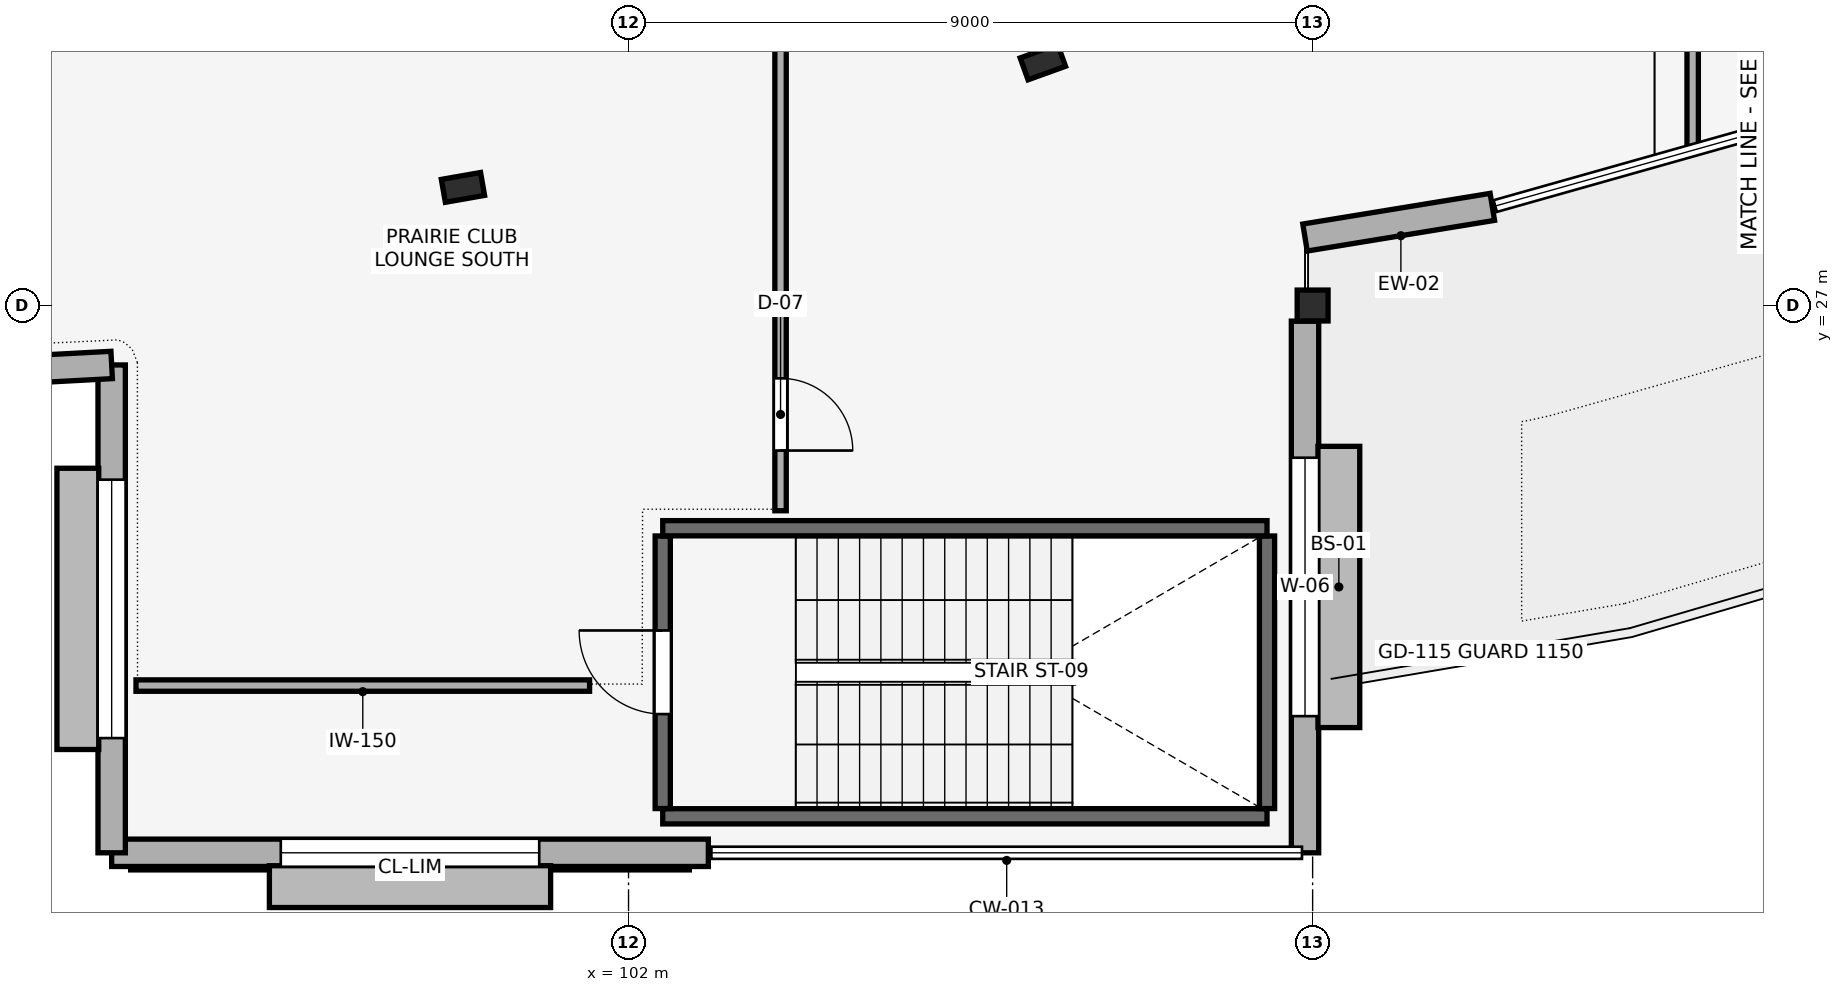
"""IFC4 building model, lengths in metres.
Left out: names, types, materials, properties, quantities, classifications, styles, units other than length and angle.
Written with IfcOpenShell. Run it as: python <this file> out.ifc"""

import sys

from ifc_helpers import new_model, si_unit, direction, frame, frame_2d, origin, origin_2d, place, context, subcontext, project, spatial, rectangle, hollow_circle, i_section, extrude, element, fill, save


model = new_model("IFC4")
c1 = context("Model", 3, precision=1e-05, world=origin(), true_north=direction((0.0, 1.0)))
c2 = subcontext(c1, "Body", "Model", "MODEL_VIEW")
j1 = project(units=[si_unit("LENGTHUNIT", "METRE"), si_unit("PLANEANGLEUNIT", "RADIAN")], contexts=[c1])
p1 = place(None, origin())
s1 = spatial("IfcSite", under=j1, at=p1, CompositionType="ELEMENT")
p2 = place(p1, origin())
s2 = spatial("IfcBuilding", under=s1, at=p2, CompositionType="ELEMENT")
p3 = place(p2, frame((0.0, 0.0, 10.2)))
s3 = spatial("IfcBuildingStorey", under=s2, at=p3, CompositionType="ELEMENT", Elevation=10.2)
for number, where, z_axis, x_axis in (
    (1, (99.822, 28.554, 0.0), (0.0, 0.0, 1.0), (0.173, -0.985, 0.0)),
    (2, (107.451, 30.202, 0.0), (0.0, 0.0, 1.0), (0.34, -0.941, 0.0)),
):
    element("IfcColumn", number, at=place(p3, frame(where, z_axis=z_axis, x_axis=x_axis)), inside=s3, PredefinedType="COLUMN", context=c2, shape_type="SweptSolid", body=[
        extrude(i_section(OverallWidth=0.306, OverallDepth=0.524, WebThickness=0.021, FlangeThickness=0.04, FilletRadius=0.027, at=origin_2d()), origin(), (0.0, 0.0, 1.0), 4.8),
    ])
p4 = place(p3, frame((111.0, 27.0, 0.0), z_axis=(0.0, 0.0, 1.0), x_axis=(1.0, 0.0, 0.0)))
e3 = element("IfcColumn", 3, at=p4, inside=s3, PredefinedType="COLUMN", context=c2, shape_type="SweptSolid", body=[
    extrude(hollow_circle(Radius=0.203, WallThickness=0.016, at=origin_2d()), origin(), (0.0, 0.0, 1.0), 4.8),
])
p5 = place(p3, frame((113.364, 28.298, 0.0), z_axis=(0.0, 0.0, 1.0), x_axis=(-0.986886195598, -0.161417585589, 0.0)))
e4 = element("IfcWall", 4, at=p5, inside=s3, PredefinedType="STANDARD", context=c2, shape_type="SweptSolid", body=[
    extrude(rectangle(XDim=2.497, YDim=0.36, at=frame_2d((1.249, 0.0))), origin(), (0.0, 0.0, 1.0), 4.52),
])
p6 = place(p3, frame((110.9, 26.795, 0.0), z_axis=(0.0, 0.0, 1.0), x_axis=(0.0, -1.0, 0.0)))
e5 = element("IfcWall", 5, at=p6, inside=s3, PredefinedType="STANDARD", context=c2, shape_type="SweptSolid", body=[
    extrude(rectangle(XDim=6.995, YDim=0.36, at=frame_2d((3.498, 0.0))), origin(), (0.0, 0.0, 1.0), 4.52),
])
p7 = place(p6, frame((1.797, 0.0, 0.9)))
e6 = element("IfcOpeningElement", 6, at=p7, cuts=e5, PredefinedType="OPENING", context=c2, shape_type="SweptSolid", body=[
    extrude(rectangle(XDim=3.4, YDim=2.0, at=frame_2d((1.7, 1.0))), frame((0.0, 0.19, 0.0), z_axis=(0.0, -1.0, 0.0), x_axis=(1.0, 0.0, 0.0)), (0.0, 0.0, 1.0), 0.38),
])
p8 = place(p3, frame((103.05, 19.8, 0.0), z_axis=(0.0, 0.0, 1.0), x_axis=(-1.0, 0.0, 0.0)))
e7 = element("IfcWall", 7, at=p8, inside=s3, PredefinedType="STANDARD", context=c2, shape_type="SweptSolid", body=[
    extrude(rectangle(XDim=7.85, YDim=0.36, at=frame_2d((3.925, 0.0))), origin(), (0.0, 0.0, 1.0), 4.52),
])
p9 = place(p8, frame((2.225, 0.0, 0.9)))
e8 = element("IfcOpeningElement", 8, at=p9, cuts=e7, PredefinedType="OPENING", context=c2, shape_type="SweptSolid", body=[
    extrude(rectangle(XDim=3.4, YDim=2.0, at=frame_2d((1.7, 1.0))), frame((0.0, 0.19, 0.0), z_axis=(0.0, -1.0, 0.0), x_axis=(1.0, 0.0, 0.0)), (0.0, 0.0, 1.0), 0.38),
])
p10 = place(p3, frame((95.2, 19.8, 0.0), z_axis=(0.0, 0.0, 1.0), x_axis=(0.0, 1.0, 0.0)))
e9 = element("IfcWall", 9, at=p10, inside=s3, PredefinedType="STANDARD", context=c2, shape_type="SweptSolid", body=[
    extrude(rectangle(XDim=6.418, YDim=0.36, at=frame_2d((3.209, 0.0))), origin(), (0.0, 0.0, 1.0), 4.52),
])
p11 = place(p10, frame((1.509, 0.0, 0.9)))
e10 = element("IfcOpeningElement", 10, at=p11, cuts=e9, PredefinedType="OPENING", context=c2, shape_type="SweptSolid", body=[
    extrude(rectangle(XDim=3.4, YDim=2.0, at=frame_2d((1.7, 1.0))), frame((0.0, 0.19, 0.0), z_axis=(0.0, -1.0, 0.0), x_axis=(1.0, 0.0, 0.0)), (0.0, 0.0, 1.0), 0.38),
])
p12 = place(p3, frame((95.2, 26.218, 0.0), z_axis=(0.0, 0.0, 1.0), x_axis=(-0.998566546223, -0.053524319368, 0.0)))
e11 = element("IfcWall", 11, at=p12, inside=s3, PredefinedType="STANDARD", context=c2, shape_type="SweptSolid", body=[
    extrude(rectangle(XDim=2.203, YDim=0.36, at=frame_2d((1.102, 0.0))), origin(), (0.0, 0.0, 1.0), 4.52),
])
p13 = place(p3, frame((102.45, 20.28, 0.0), z_axis=(0.0, 0.0, 1.0), x_axis=(1.0, 0.0, 0.0)))
e12 = element("IfcWall", 12, at=p13, inside=s3, PredefinedType="SHEAR", context=c2, shape_type="SweptSolid", body=[
    extrude(rectangle(XDim=7.95, YDim=0.2, at=frame_2d((3.975, 0.0))), origin(), (0.0, 0.0, 1.0), 4.8),
])
p14 = place(p3, frame((102.45, 20.382, 0.0), z_axis=(0.0, 0.0, 1.0), x_axis=(0.0, 1.0, 0.0)))
e13 = element("IfcWall", 13, at=p14, inside=s3, PredefinedType="SHEAR", context=c2, shape_type="SweptSolid", body=[
    extrude(rectangle(XDim=3.586, YDim=0.2, at=frame_2d((1.793, 0.0))), origin(), (0.0, 0.0, 1.0), 4.8),
])
p15 = place(p14, frame((1.243, 0.0, 0.0)))
e14 = element("IfcOpeningElement", 14, at=p15, cuts=e13, PredefinedType="OPENING", context=c2, shape_type="SweptSolid", body=[
    extrude(rectangle(XDim=1.1, YDim=2.15, at=frame_2d((0.55, 1.075))), frame((0.0, 0.11, 0.0), z_axis=(0.0, -1.0, 0.0), x_axis=(1.0, 0.0, 0.0)), (0.0, 0.0, 1.0), 0.22),
])
p16 = place(p3, frame((110.4, 20.382, 0.0), z_axis=(0.0, 0.0, 1.0), x_axis=(0.0, 1.0, 0.0)))
e15 = element("IfcWall", 15, at=p16, inside=s3, PredefinedType="SHEAR", context=c2, shape_type="SweptSolid", body=[
    extrude(rectangle(XDim=3.586, YDim=0.2, at=frame_2d((1.793, 0.0))), origin(), (0.0, 0.0, 1.0), 4.8),
])
p17 = place(p3, frame((102.45, 24.07, 0.0), z_axis=(0.0, 0.0, 1.0), x_axis=(1.0, 0.0, 0.0)))
e16 = element("IfcWall", 16, at=p17, inside=s3, PredefinedType="SHEAR", context=c2, shape_type="SweptSolid", body=[
    extrude(rectangle(XDim=7.95, YDim=0.2, at=frame_2d((3.975, 0.0))), origin(), (0.0, 0.0, 1.0), 4.8),
])
p18 = place(p3, frame((101.488, 22.0, 0.0), z_axis=(0.0, 0.0, 1.0), x_axis=(-1.0, 0.0, 0.0)))
e17 = element("IfcWall", 17, at=p18, inside=s3, PredefinedType="PARTITIONING", context=c2, shape_type="SweptSolid", body=[
    extrude(rectangle(XDim=5.968, YDim=0.15, at=frame_2d((2.984, 0.0))), origin(), (0.0, 0.0, 1.0), 4.52),
])
p19 = place(p3, frame((104.0, 32.0, 0.0), z_axis=(0.0, 0.0, 1.0), x_axis=(0.0, -1.0, 0.0)))
e18 = element("IfcWall", 18, at=p19, inside=s3, PredefinedType="PARTITIONING", context=c2, shape_type="SweptSolid", body=[
    extrude(rectangle(XDim=7.7, YDim=0.15, at=frame_2d((3.85, 0.0))), origin(), (0.0, 0.0, 1.0), 4.52),
])
p20 = place(p19, frame((5.958, 0.0, 0.0)))
e19 = element("IfcOpeningElement", 19, at=p20, cuts=e18, PredefinedType="OPENING", context=c2, shape_type="SweptSolid", body=[
    extrude(rectangle(XDim=0.95, YDim=2.1, at=frame_2d((0.475, 1.05))), frame((0.0, 0.085, 0.0), z_axis=(0.0, -1.0, 0.0), x_axis=(1.0, 0.0, 0.0)), (0.0, 0.0, 1.0), 0.17),
])
p21 = place(p3, frame((116.0, 29.062, 0.0), z_axis=(0.0, 0.0, 1.0), x_axis=(0.0, 1.0, 0.0)))
e20 = element("IfcWall", 20, at=p21, inside=s3, PredefinedType="PARTITIONING", context=c2, shape_type="SweptSolid", body=[
    extrude(rectangle(XDim=4.938, YDim=0.15, at=frame_2d((2.469, 0.0))), origin(), (0.0, 0.0, 1.0), 4.52),
])
p22 = place(p7, origin())
e21 = element("IfcWindow", 21, at=p22, inside=s3, PartitioningType="SINGLE_PANEL", PredefinedType="WINDOW", context=c2, shape_type="SweptSolid", body=[
    extrude(rectangle(XDim=3.4, YDim=2.0, at=frame_2d((1.7, 1.0))), frame((0.0, 0.03, 0.0), z_axis=(0.0, -1.0, 0.0), x_axis=(1.0, 0.0, 0.0)), (0.0, 0.0, 1.0), 0.06),
])
fill(e6, e21)
p23 = place(p9, origin())
e22 = element("IfcWindow", 22, at=p23, inside=s3, PartitioningType="SINGLE_PANEL", PredefinedType="WINDOW", context=c2, shape_type="SweptSolid", body=[
    extrude(rectangle(XDim=3.4, YDim=2.0, at=frame_2d((1.7, 1.0))), frame((0.0, 0.03, 0.0), z_axis=(0.0, -1.0, 0.0), x_axis=(1.0, 0.0, 0.0)), (0.0, 0.0, 1.0), 0.06),
])
fill(e8, e22)
p24 = place(p11, origin())
e23 = element("IfcWindow", 23, at=p24, inside=s3, PartitioningType="SINGLE_PANEL", PredefinedType="WINDOW", context=c2, shape_type="SweptSolid", body=[
    extrude(rectangle(XDim=3.4, YDim=2.0, at=frame_2d((1.7, 1.0))), frame((0.0, 0.03, 0.0), z_axis=(0.0, -1.0, 0.0), x_axis=(1.0, 0.0, 0.0)), (0.0, 0.0, 1.0), 0.06),
])
fill(e10, e23)
p25 = place(p15, frame((1.1, 0.0, 0.0), z_axis=(0.0, 0.0, 1.0), x_axis=(-1.0, 0.0, 0.0)))
e24 = element("IfcDoor", 24, at=p25, inside=s3, OperationType="SINGLE_SWING_LEFT", PredefinedType="DOOR", context=c2, shape_type="SweptSolid", body=[
    extrude(rectangle(XDim=1.1, YDim=2.15, at=frame_2d((0.55, 1.075))), frame((0.0, 0.025, 0.0), z_axis=(0.0, -1.0, 0.0), x_axis=(1.0, 0.0, 0.0)), (0.0, 0.0, 1.0), 0.05),
])
fill(e14, e24)
p26 = place(p20, origin())
e25 = element("IfcDoor", 25, at=p26, inside=s3, OperationType="SINGLE_SWING_RIGHT", PredefinedType="DOOR", context=c2, shape_type="SweptSolid", body=[
    extrude(rectangle(XDim=0.95, YDim=2.1, at=frame_2d((0.475, 1.05))), frame((0.0, 0.025, 0.0), z_axis=(0.0, -1.0, 0.0), x_axis=(1.0, 0.0, 0.0)), (0.0, 0.0, 1.0), 0.05),
])
fill(e19, e25)
save(model, sys.argv[1])
